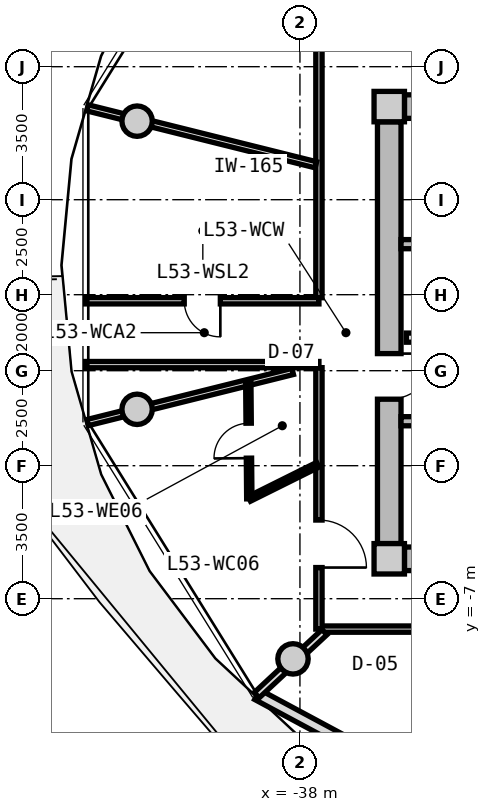
"""IFC4 building model, lengths in metres.
Left out: names, types, materials, properties, quantities, classifications, styles, units other than length and angle.
Written with IfcOpenShell. Run it as: python <this file> out.ifc"""

import sys

from ifc_helpers import new_model, si_unit, direction, frame, frame_2d, origin, origin_2d, place, context, subcontext, project, spatial, rectangle, circle, extrude, source, transform, mapped, element, fill, save


model = new_model("IFC4")
c1 = context("Model", 3, precision=1e-05, world=origin(), true_north=direction((0.0, 1.0)))
c2 = subcontext(c1, "Body", "Model", "MODEL_VIEW")
j1 = project(units=[si_unit("LENGTHUNIT", "METRE"), si_unit("PLANEANGLEUNIT", "RADIAN")], contexts=[c1])
p1 = place(None, origin())
s1 = spatial("IfcSite", under=j1, at=p1, CompositionType="ELEMENT")
p2 = place(p1, origin())
s2 = spatial("IfcBuilding", under=s1, at=p2, CompositionType="ELEMENT")
p3 = place(p2, frame((0.0, 0.0, 170.9)))
s3 = spatial("IfcBuildingStorey", under=s2, at=p3, CompositionType="ELEMENT", Elevation=170.9)
m1 = source(origin(), c2, "Body", "SweptSolid", [
    extrude(rectangle(XDim=0.8, YDim=0.8, at=origin_2d()), origin(), (0.0, 0.0, 1.0), 3.05),
])
for number, where, z_axis, x_axis in (
    (1, (-35.65, -5.95, 0.0), (0.0, 0.0, 1.0), (1.0, 0.0, 0.0)),
    (2, (-35.65, 5.95, 0.0), (0.0, 0.0, 1.0), (1.0, 0.0, 0.0)),
):
    element("IfcColumn", number, at=place(p3, frame(where, z_axis=z_axis, x_axis=x_axis)), inside=s3, PredefinedType="COLUMN", context=c2, shape_type="MappedRepresentation", body=[
        mapped(m1, transform((0.0, 0.0, 0.0), x_axis=(1.0, 0.0, 0.0), y_axis=(0.0, 1.0, 0.0), z_axis=(0.0, 0.0, 1.0), scale=1.0)),
    ])
m2 = source(origin(), c2, "Body", "SweptSolid", [
    extrude(rectangle(XDim=14.5, YDim=0.62, at=frame_2d((7.25, 0.0))), origin(), (0.0, 0.0, 1.0), 2.81),
])
for number, where, z_axis, x_axis in (
    (3, (-35.25, 5.95, 0.0), (0.0, 0.0, 1.0), (1.0, 0.0, 0.0)),
    (4, (-20.75, -5.95, 0.0), (0.0, 0.0, 1.0), (-1.0, 0.0, 0.0)),
):
    element("IfcWall", number, at=place(p3, frame(where, z_axis=z_axis, x_axis=x_axis)), inside=s3, PredefinedType="SHEAR", context=c2, shape_type="MappedRepresentation", body=[
        mapped(m2, transform((0.0, 0.0, 0.0), x_axis=(1.0, 0.0, 0.0), y_axis=(0.0, 1.0, 0.0), z_axis=(0.0, 0.0, 1.0), scale=1.0)),
    ])
m3 = source(origin(), c2, "Body", "SweptSolid", [
    extrude(rectangle(XDim=11.1, YDim=0.62, at=frame_2d((5.55, 0.0))), origin(), (0.0, 0.0, 1.0), 2.81),
])
p4 = place(p3, frame((-35.65, -5.55, 0.0), z_axis=(0.0, 0.0, 1.0), x_axis=(0.0, 1.0, 0.0)))
e5 = element("IfcWall", 5, at=p4, inside=s3, PredefinedType="SHEAR", context=c2, shape_type="MappedRepresentation", body=[
    mapped(m3, transform((0.0, 0.0, 0.0), x_axis=(1.0, 0.0, 0.0), y_axis=(0.0, 1.0, 0.0), z_axis=(0.0, 0.0, 1.0), scale=1.0)),
])
p5 = place(p4, frame((3.8, 0.0, 0.0)))
e6 = element("IfcOpeningElement", 6, at=p5, cuts=e5, PredefinedType="OPENING", context=c2, shape_type="SweptSolid", body=[
    extrude(rectangle(XDim=1.2, YDim=2.15, at=frame_2d((0.6, 1.075))), frame((0.0, 0.32, 0.0), z_axis=(0.0, -1.0, 0.0), x_axis=(1.0, 0.0, 0.0)), (0.0, 0.0, 1.0), 0.64),
])
m4 = source(origin(), c2, "Body", "SweptSolid", [
    extrude(circle(Radius=0.4, at=origin_2d()), origin(), (0.0, 0.0, 1.0), 3.05),
])
for number, where, z_axis, x_axis in (
    (7, (-42.285, 5.567, 0.0), (0.0, 0.0, 1.0), (1.0, 0.0, 0.0)),
    (8, (-42.285, -2.016, 0.0), (0.0, 0.0, 1.0), (1.0, 0.0, 0.0)),
    (9, (-38.183, -8.584, 0.0), (0.0, 0.0, 1.0), (1.0, 0.0, 0.0)),
):
    element("IfcColumn", number, at=place(p3, frame(where, z_axis=z_axis, x_axis=x_axis)), inside=s3, PredefinedType="COLUMN", context=c2, shape_type="MappedRepresentation", body=[
        mapped(m4, transform((0.0, 0.0, 0.0), x_axis=(1.0, 0.0, 0.0), y_axis=(0.0, 1.0, 0.0), z_axis=(0.0, 0.0, 1.0), scale=1.0)),
    ])
m5 = source(origin(), c2, "Body", "SweptSolid", [
    extrude(rectangle(XDim=8.742, YDim=0.29, at=frame_2d((4.371, 0.0))), origin(), (0.0, 0.0, 1.0), 2.81),
])
p6 = place(p3, frame((-31.422, -13.66, 0.0), z_axis=(0.0, 0.0, 1.0), x_axis=(-0.880992489116, 0.473130250693, 0.0)))
e10 = element("IfcWall", 10, at=p6, inside=s3, PredefinedType="SOLIDWALL", context=c2, shape_type="MappedRepresentation", body=[
    mapped(m5, transform((0.0, 0.0, 0.0), x_axis=(1.0, 0.0, 0.0), y_axis=(0.0, 1.0, 0.0), z_axis=(0.0, 0.0, 1.0), scale=1.0)),
])
p7 = place(p6, frame((0.9, 0.0, 0.0)))
e11 = element("IfcOpeningElement", 11, at=p7, cuts=e10, PredefinedType="OPENING", context=c2, shape_type="SweptSolid", body=[
    extrude(rectangle(XDim=1.15, YDim=2.25, at=frame_2d((0.575, 1.125))), frame((0.0, 0.155, 0.0), z_axis=(0.0, -1.0, 0.0), x_axis=(1.0, 0.0, 0.0)), (0.0, 0.0, 1.0), 0.31),
])
p8 = place(p6, frame((4.721, 0.0, 0.85)))
e12 = element("IfcOpeningElement", 12, at=p8, cuts=e10, PredefinedType="OPENING", context=c2, shape_type="SweptSolid", body=[
    extrude(rectangle(XDim=1.2, YDim=1.5, at=frame_2d((0.6, 0.75))), frame((0.0, 0.155, 0.0), z_axis=(0.0, -1.0, 0.0), x_axis=(1.0, 0.0, 0.0)), (0.0, 0.0, 1.0), 0.31),
])
m6 = source(origin(), c2, "Body", "SweptSolid", [
    extrude(rectangle(XDim=7.88, YDim=0.24, at=frame_2d((3.94, 0.0))), origin(), (0.0, 0.0, 1.0), 2.81),
])
p9 = place(p3, frame((-35.34, 2.33, 0.0), z_axis=(0.0, 0.0, 1.0), x_axis=(1.0, 0.0, 0.0)))
e13 = element("IfcWall", 13, at=p9, inside=s3, PredefinedType="PARTITIONING", context=c2, shape_type="MappedRepresentation", body=[
    mapped(m6, transform((0.0, 0.0, 0.0), x_axis=(1.0, 0.0, 0.0), y_axis=(0.0, 1.0, 0.0), z_axis=(0.0, 0.0, 1.0), scale=1.0)),
])
p10 = place(p3, frame((-35.34, -2.33, 0.0), z_axis=(0.0, 0.0, 1.0), x_axis=(1.0, 0.0, 0.0)))
e14 = element("IfcWall", 14, at=p10, inside=s3, PredefinedType="PARTITIONING", context=c2, shape_type="MappedRepresentation", body=[
    mapped(m6, transform((0.0, 0.0, 0.0), x_axis=(1.0, 0.0, 0.0), y_axis=(0.0, 1.0, 0.0), z_axis=(0.0, 0.0, 1.0), scale=1.0)),
])
p11 = place(p10, frame((1.0, 0.0, 0.0)))
e15 = element("IfcOpeningElement", 15, at=p11, cuts=e14, PredefinedType="OPENING", context=c2, shape_type="SweptSolid", body=[
    extrude(rectangle(XDim=1.1, YDim=2.15, at=frame_2d((0.55, 1.075))), frame((0.0, 0.13, 0.0), z_axis=(0.0, -1.0, 0.0), x_axis=(1.0, 0.0, 0.0)), (0.0, 0.0, 1.0), 0.26),
])
m7 = source(origin(), c2, "Body", "SweptSolid", [
    extrude(rectangle(XDim=7.62, YDim=0.24, at=frame_2d((3.81, 0.0))), origin(), (0.0, 0.0, 1.0), 2.795),
])
p12 = place(p3, frame((-35.2, -0.13, 0.0), z_axis=(0.0, 0.0, 1.0), x_axis=(1.0, 0.0, 0.0)))
e16 = element("IfcWall", 16, at=p12, inside=s3, PredefinedType="PARTITIONING", context=c2, shape_type="MappedRepresentation", body=[
    mapped(m7, transform((0.0, 0.0, 0.0), x_axis=(1.0, 0.0, 0.0), y_axis=(0.0, 1.0, 0.0), z_axis=(0.0, 0.0, 1.0), scale=1.0)),
])
p13 = place(p12, frame((6.22, 0.0, 0.0)))
e17 = element("IfcOpeningElement", 17, at=p13, cuts=e16, PredefinedType="OPENING", context=c2, shape_type="SweptSolid", body=[
    extrude(rectangle(XDim=1.0, YDim=2.1, at=frame_2d((0.5, 1.05))), frame((0.0, 0.13, 0.0), z_axis=(0.0, -1.0, 0.0), x_axis=(1.0, 0.0, 0.0)), (0.0, 0.0, 1.0), 0.26),
])
p14 = place(p12, frame((2.4, 0.0, 0.0)))
e18 = element("IfcOpeningElement", 18, at=p14, cuts=e16, PredefinedType="OPENING", context=c2, shape_type="SweptSolid", body=[
    extrude(rectangle(XDim=1.0, YDim=2.1, at=frame_2d((0.5, 1.05))), frame((0.0, 0.13, 0.0), z_axis=(0.0, -1.0, 0.0), x_axis=(1.0, 0.0, 0.0)), (0.0, 0.0, 1.0), 0.26),
])
m8 = source(origin(), c2, "Body", "SweptSolid", [
    extrude(rectangle(XDim=19.0, YDim=0.165, at=frame_2d((9.5, 0.0))), origin(), (0.0, 0.0, 1.0), 2.795),
])
p15 = place(p3, frame((-18.5, -7.8, 0.0), z_axis=(0.0, 0.0, 1.0), x_axis=(-1.0, 0.0, 0.0)))
e19 = element("IfcWall", 19, at=p15, inside=s3, PredefinedType="PARTITIONING", context=c2, shape_type="MappedRepresentation", body=[
    mapped(m8, transform((0.0, 0.0, 0.0), x_axis=(1.0, 0.0, 0.0), y_axis=(0.0, 1.0, 0.0), z_axis=(0.0, 0.0, 1.0), scale=1.0)),
])
p16 = place(p15, frame((8.875, 0.0, 0.0)))
e20 = element("IfcOpeningElement", 20, at=p16, cuts=e19, PredefinedType="OPENING", context=c2, shape_type="SweptSolid", body=[
    extrude(rectangle(XDim=1.25, YDim=2.2, at=frame_2d((0.625, 1.1))), frame((0.0, 0.093, 0.0), z_axis=(0.0, -1.0, 0.0), x_axis=(1.0, 0.0, 0.0)), (0.0, 0.0, 1.0), 0.185),
])
m9 = source(origin(), c2, "Body", "SweptSolid", [
    extrude(rectangle(XDim=6.88, YDim=0.165, at=frame_2d((3.44, 0.0))), origin(), (0.0, 0.0, 1.0), 2.795),
])
p17 = place(p3, frame((-37.5, -7.8, 0.0), z_axis=(0.0, 0.0, 1.0), x_axis=(0.0, 1.0, 0.0)))
e21 = element("IfcWall", 21, at=p17, inside=s3, PredefinedType="PARTITIONING", context=c2, shape_type="MappedRepresentation", body=[
    mapped(m9, transform((0.0, 0.0, 0.0), x_axis=(1.0, 0.0, 0.0), y_axis=(0.0, 1.0, 0.0), z_axis=(0.0, 0.0, 1.0), scale=1.0)),
])
p18 = place(p17, frame((1.62, 0.0, 0.0)))
e22 = element("IfcOpeningElement", 22, at=p18, cuts=e21, PredefinedType="OPENING", context=c2, shape_type="SweptSolid", body=[
    extrude(rectangle(XDim=1.25, YDim=2.2, at=frame_2d((0.625, 1.1))), frame((0.0, 0.093, 0.0), z_axis=(0.0, -1.0, 0.0), x_axis=(1.0, 0.0, 0.0)), (0.0, 0.0, 1.0), 0.185),
])
p19 = place(p3, frame((-37.5, 0.92, 0.0), z_axis=(0.0, 0.0, 1.0), x_axis=(0.0, 1.0, 0.0)))
e23 = element("IfcWall", 23, at=p19, inside=s3, PredefinedType="PARTITIONING", context=c2, shape_type="MappedRepresentation", body=[
    mapped(m9, transform((0.0, 0.0, 0.0), x_axis=(1.0, 0.0, 0.0), y_axis=(0.0, 1.0, 0.0), z_axis=(0.0, 0.0, 1.0), scale=1.0)),
])
m10 = source(origin(), c2, "Body", "SweptSolid", [
    extrude(rectangle(XDim=6.193, YDim=0.165, at=frame_2d((3.096, 0.0))), origin(), (0.0, 0.0, 1.0), 2.345),
])
p20 = place(p3, frame((-37.58, 4.419, 0.0), z_axis=(0.0, 0.0, 1.0), x_axis=(-0.970309243466, 0.241867674657, 0.0)))
e24 = element("IfcWall", 24, at=p20, inside=s3, PredefinedType="PARTITIONING", context=c2, shape_type="MappedRepresentation", body=[
    mapped(m10, transform((0.0, 0.0, 0.0), x_axis=(1.0, 0.0, 0.0), y_axis=(0.0, 1.0, 0.0), z_axis=(0.0, 0.0, 1.0), scale=1.0)),
])
m11 = source(origin(), c2, "Body", "SweptSolid", [
    extrude(rectangle(XDim=5.564, YDim=0.165, at=frame_2d((2.782, 0.0))), origin(), (0.0, 0.0, 1.0), 2.345),
])
p21 = place(p3, frame((-38.19, -1.02, 0.0), z_axis=(0.0, 0.0, 1.0), x_axis=(-0.97031260977, -0.241854169533, 0.0)))
e25 = element("IfcWall", 25, at=p21, inside=s3, PredefinedType="PARTITIONING", context=c2, shape_type="MappedRepresentation", body=[
    mapped(m11, transform((0.0, 0.0, 0.0), x_axis=(1.0, 0.0, 0.0), y_axis=(0.0, 1.0, 0.0), z_axis=(0.0, 0.0, 1.0), scale=1.0)),
])
m12 = source(origin(), c2, "Body", "SweptSolid", [
    extrude(rectangle(XDim=6.139, YDim=0.165, at=frame_2d((3.069, 0.0))), origin(), (0.0, 0.0, 1.0), 2.795),
])
p22 = place(p3, frame((-43.639, 0.84, 0.0), z_axis=(0.0, 0.0, 1.0), x_axis=(1.0, 0.0, 0.0)))
e26 = element("IfcWall", 26, at=p22, inside=s3, PredefinedType="PARTITIONING", context=c2, shape_type="MappedRepresentation", body=[
    mapped(m12, transform((0.0, 0.0, 0.0), x_axis=(1.0, 0.0, 0.0), y_axis=(0.0, 1.0, 0.0), z_axis=(0.0, 0.0, 1.0), scale=1.0)),
])
p23 = place(p22, frame((2.594, 0.0, 0.0)))
e27 = element("IfcOpeningElement", 27, at=p23, cuts=e26, PredefinedType="OPENING", context=c2, shape_type="SweptSolid", body=[
    extrude(rectangle(XDim=0.95, YDim=2.1, at=frame_2d((0.475, 1.05))), frame((0.0, 0.093, 0.0), z_axis=(0.0, -1.0, 0.0), x_axis=(1.0, 0.0, 0.0)), (0.0, 0.0, 1.0), 0.185),
])
p24 = place(p3, frame((-37.5, -0.84, 0.0), z_axis=(0.0, 0.0, 1.0), x_axis=(-1.0, 0.0, 0.0)))
e28 = element("IfcWall", 28, at=p24, inside=s3, PredefinedType="PARTITIONING", context=c2, shape_type="MappedRepresentation", body=[
    mapped(m12, transform((0.0, 0.0, 0.0), x_axis=(1.0, 0.0, 0.0), y_axis=(0.0, 1.0, 0.0), z_axis=(0.0, 0.0, 1.0), scale=1.0)),
])
m13 = source(origin(), c2, "Body", "SweptSolid", [
    extrude(rectangle(XDim=2.435, YDim=0.19, at=frame_2d((1.217, 0.0))), origin(), (0.0, 0.0, 1.0), 2.345),
])
p25 = place(p3, frame((-37.354, -7.88, 0.0), z_axis=(0.0, 0.0, 1.0), x_axis=(-0.732164643118, -0.681127693878, 0.0)))
e29 = element("IfcWall", 29, at=p25, inside=s3, PredefinedType="PARTITIONING", context=c2, shape_type="MappedRepresentation", body=[
    mapped(m13, transform((0.0, 0.0, 0.0), x_axis=(1.0, 0.0, 0.0), y_axis=(0.0, 1.0, 0.0), z_axis=(0.0, 0.0, 1.0), scale=1.0)),
])
m14 = source(origin(), c2, "Body", "SweptSolid", [
    extrude(rectangle(XDim=2.013, YDim=0.14, at=frame_2d((1.006, 0.0))), origin(), (0.0, 0.0, 1.0), 2.795),
])
p26 = place(p3, frame((-37.53, -3.476, 0.0), z_axis=(0.0, 0.0, 1.0), x_axis=(-0.895347078862, -0.445369069843, 0.0)))
e30 = element("IfcWall", 30, at=p26, inside=s3, PredefinedType="PARTITIONING", context=c2, shape_type="MappedRepresentation", body=[
    mapped(m14, transform((0.0, 0.0, 0.0), x_axis=(1.0, 0.0, 0.0), y_axis=(0.0, 1.0, 0.0), z_axis=(0.0, 0.0, 1.0), scale=1.0)),
])
m15 = source(origin(), c2, "Body", "SweptSolid", [
    extrude(rectangle(XDim=3.062, YDim=0.14, at=frame_2d((1.531, 0.0))), origin(), (0.0, 0.0, 1.0), 2.795),
])
p27 = place(p3, frame((-39.332, -4.372, 0.0), z_axis=(0.0, 0.0, 1.0), x_axis=(-0.008691856662, 0.9999622251, 0.0)))
e31 = element("IfcWall", 31, at=p27, inside=s3, PredefinedType="PARTITIONING", context=c2, shape_type="MappedRepresentation", body=[
    mapped(m15, transform((0.0, 0.0, 0.0), x_axis=(1.0, 0.0, 0.0), y_axis=(0.0, 1.0, 0.0), z_axis=(0.0, 0.0, 1.0), scale=1.0)),
])
p28 = place(p27, frame((1.071, 0.0, 0.0)))
e32 = element("IfcOpeningElement", 32, at=p28, cuts=e31, PredefinedType="OPENING", context=c2, shape_type="SweptSolid", body=[
    extrude(rectangle(XDim=0.92, YDim=2.1, at=frame_2d((0.46, 1.05))), frame((0.0, 0.08, 0.0), z_axis=(0.0, -1.0, 0.0), x_axis=(1.0, 0.0, 0.0)), (0.0, 0.0, 1.0), 0.16),
])
m16 = source(origin(), c2, "Body", "SweptSolid", [
    extrude(rectangle(XDim=1.2, YDim=2.15, at=frame_2d((0.6, 1.075))), frame((0.0, 0.025, 0.0), z_axis=(0.0, -1.0, 0.0), x_axis=(1.0, 0.0, 0.0)), (0.0, 0.0, 1.0), 0.05),
])
p29 = place(p5, frame((1.2, 0.0, 0.0), z_axis=(0.0, 0.0, 1.0), x_axis=(-1.0, 0.0, 0.0)))
e33 = element("IfcDoor", 33, at=p29, inside=s3, OperationType="SINGLE_SWING_LEFT", PredefinedType="DOOR", context=c2, shape_type="MappedRepresentation", body=[
    mapped(m16, transform((0.0, 0.0, 0.0), x_axis=(1.0, 0.0, 0.0), y_axis=(0.0, 1.0, 0.0), z_axis=(0.0, 0.0, 1.0), scale=1.0)),
])
fill(e6, e33)
m17 = source(origin(), c2, "Body", "SweptSolid", [
    extrude(rectangle(XDim=0.95, YDim=2.1, at=frame_2d((0.475, 1.05))), frame((0.0, 0.025, 0.0), z_axis=(0.0, -1.0, 0.0), x_axis=(1.0, 0.0, 0.0)), (0.0, 0.0, 1.0), 0.05),
])
p30 = place(p23, frame((0.95, 0.0, 0.0), z_axis=(0.0, 0.0, 1.0), x_axis=(-1.0, 0.0, 0.0)))
e34 = element("IfcDoor", 34, at=p30, inside=s3, OperationType="SINGLE_SWING_LEFT", PredefinedType="DOOR", context=c2, shape_type="MappedRepresentation", body=[
    mapped(m17, transform((0.0, 0.0, 0.0), x_axis=(1.0, 0.0, 0.0), y_axis=(0.0, 1.0, 0.0), z_axis=(0.0, 0.0, 1.0), scale=1.0)),
])
fill(e27, e34)
m18 = source(origin(), c2, "Body", "SweptSolid", [
    extrude(rectangle(XDim=1.25, YDim=2.2, at=frame_2d((0.625, 1.1))), frame((0.0, 0.025, 0.0), z_axis=(0.0, -1.0, 0.0), x_axis=(1.0, 0.0, 0.0)), (0.0, 0.0, 1.0), 0.05),
])
p31 = place(p18, frame((1.25, 0.0, 0.0), z_axis=(0.0, 0.0, 1.0), x_axis=(-1.0, 0.0, 0.0)))
e35 = element("IfcDoor", 35, at=p31, inside=s3, OperationType="SINGLE_SWING_RIGHT", PredefinedType="DOOR", context=c2, shape_type="MappedRepresentation", body=[
    mapped(m18, transform((0.0, 0.0, 0.0), x_axis=(1.0, 0.0, 0.0), y_axis=(0.0, 1.0, 0.0), z_axis=(0.0, 0.0, 1.0), scale=1.0)),
])
fill(e22, e35)
m19 = source(origin(), c2, "Body", "SweptSolid", [
    extrude(rectangle(XDim=0.92, YDim=2.1, at=frame_2d((0.46, 1.05))), frame((0.0, 0.025, 0.0), z_axis=(0.0, -1.0, 0.0), x_axis=(1.0, 0.0, 0.0)), (0.0, 0.0, 1.0), 0.05),
])
p32 = place(p28, origin())
e36 = element("IfcDoor", 36, at=p32, inside=s3, OperationType="SINGLE_SWING_LEFT", PredefinedType="DOOR", context=c2, shape_type="MappedRepresentation", body=[
    mapped(m19, transform((0.0, 0.0, 0.0), x_axis=(1.0, 0.0, 0.0), y_axis=(0.0, 1.0, 0.0), z_axis=(0.0, 0.0, 1.0), scale=1.0)),
])
fill(e32, e36)
save(model, sys.argv[1])
